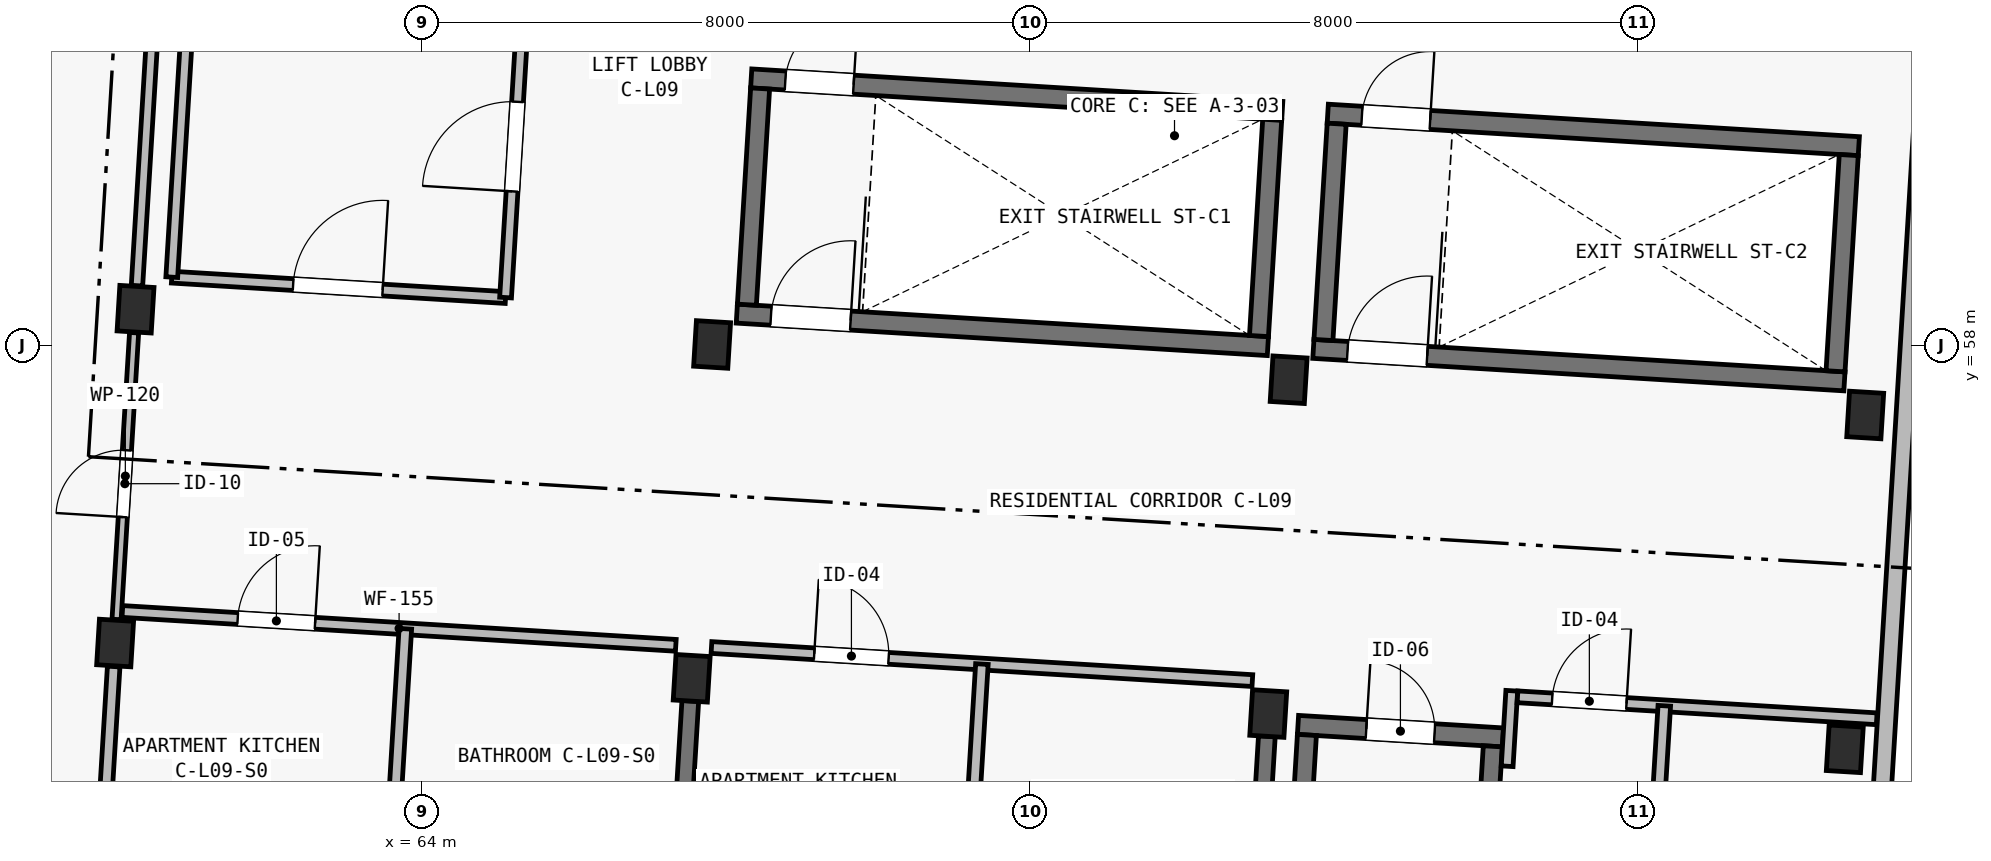
"""IFC4 building model, lengths in metres.
Left out: names, types, materials, properties, quantities, classifications, styles, units other than length and angle.
Written with IfcOpenShell. Run it as: python <this file> out.ifc"""

import sys

from ifc_helpers import new_model, si_unit, direction, frame, frame_2d, origin, origin_2d, place, context, subcontext, project, spatial, polyline, rectangle, outline, extrude, element, fill, save


model = new_model("IFC4")
c1 = context("Model", 3, precision=1e-05, world=origin(), true_north=direction((0.0, 1.0)))
c2 = subcontext(c1, "Body", "Model", "MODEL_VIEW")
j1 = project(units=[si_unit("LENGTHUNIT", "METRE"), si_unit("PLANEANGLEUNIT", "RADIAN")], contexts=[c1])
p1 = place(None, origin())
s1 = spatial("IfcSite", under=j1, at=p1, CompositionType="ELEMENT")
p2 = place(p1, origin())
s2 = spatial("IfcBuilding", under=s1, at=p2, CompositionType="ELEMENT")
p3 = place(p2, frame((0.0, 0.0, 31.15)))
s3 = spatial("IfcBuildingStorey", under=s2, at=p3, CompositionType="ELEMENT", Elevation=31.15)
for number, where, z_axis, x_axis in (
    (1, (59.964, 54.086, 0.0), (0.0, 0.0, 1.0), (0.998, -0.061, 0.0)),
    (2, (60.233, 58.478, 0.0), (0.0, 0.0, 1.0), (0.998, -0.061, 0.0)),
):
    element("IfcColumn", number, at=place(p3, frame(where, z_axis=z_axis, x_axis=x_axis)), inside=s3, PredefinedType="COLUMN", context=c2, shape_type="SweptSolid", body=[
        extrude(rectangle(XDim=0.45, YDim=0.6, at=origin_2d()), origin(), (0.0, 0.0, 1.0), 6.895),
    ])
for number, where, z_axis, x_axis in (
    (3, (67.55, 53.622, 0.0), (0.0, 0.0, 1.0), (0.998, -0.061, 0.0)),
    (4, (67.818, 58.014, 0.0), (0.0, 0.0, 1.0), (0.998, -0.061, 0.0)),
    (5, (75.135, 53.158, 0.0), (0.0, 0.0, 1.0), (0.998, -0.061, 0.0)),
    (6, (75.404, 57.55, 0.0), (0.0, 0.0, 1.0), (0.998, -0.061, 0.0)),
):
    element("IfcColumn", number, at=place(p3, frame(where, z_axis=z_axis, x_axis=x_axis)), inside=s3, PredefinedType="COLUMN", context=c2, shape_type="SweptSolid", body=[
        extrude(rectangle(XDim=0.45, YDim=0.6, at=origin_2d()), origin(), (0.0, 0.0, 1.0), 3.25),
    ])
for number, where, z_axis, x_axis in (
    (7, (82.721, 52.694, 0.0), (0.0, 0.0, 1.0), (0.998, -0.061, 0.0)),
    (8, (82.99, 57.086, 0.0), (0.0, 0.0, 1.0), (0.998, -0.061, 0.0)),
):
    element("IfcColumn", number, at=place(p3, frame(where, z_axis=z_axis, x_axis=x_axis)), inside=s3, PredefinedType="COLUMN", context=c2, shape_type="SweptSolid", body=[
        extrude(rectangle(XDim=0.45, YDim=0.6, at=origin_2d()), origin(), (0.0, 0.0, 1.0), 3.0),
    ])
p4 = place(p3, frame((67.104, 46.335, 0.0), z_axis=(0.0, 0.0, 1.0), x_axis=(0.061034188237, 0.998135676081, 0.0)))
e9 = element("IfcWall", 9, at=p4, inside=s3, PredefinedType="SHEAR", context=c2, shape_type="SweptSolid", body=[
    extrude(rectangle(XDim=7.0, YDim=0.22, at=frame_2d((3.5, 0.0))), origin(), (0.0, 0.0, 1.0), 2.5),
])
p5 = place(p3, frame((74.69, 45.872, 0.0), z_axis=(0.0, 0.0, 1.0), x_axis=(0.061036313012, 0.998135546153, 0.0)))
e10 = element("IfcWall", 10, at=p5, inside=s3, PredefinedType="SHEAR", context=c2, shape_type="SweptSolid", body=[
    extrude(rectangle(XDim=7.0, YDim=0.22, at=frame_2d((3.5, 0.0))), origin(), (0.0, 0.0, 1.0), 2.5),
])
p6 = place(p3, frame((68.333, 61.514, 0.0), z_axis=(0.0, 0.0, 1.0), x_axis=(0.998135676081, -0.061034188237, 0.0)))
e11 = element("IfcWall", 11, at=p6, inside=s3, PredefinedType="SHEAR", context=c2, shape_type="SweptSolid", body=[
    extrude(rectangle(XDim=7.0, YDim=0.25, at=frame_2d((3.5, 0.0))), origin(), (0.0, 0.0, 1.0), 3.25),
])
p7 = place(p6, frame((0.45, 0.0, 0.0)))
e12 = element("IfcOpeningElement", 12, at=p7, cuts=e11, PredefinedType="OPENING", context=c2, shape_type="SweptSolid", body=[
    extrude(rectangle(XDim=0.9, YDim=2.1, at=frame_2d((0.45, 1.05))), frame((0.0, 0.14, 0.0), z_axis=(0.0, -1.0, 0.0), x_axis=(1.0, 0.0, 0.0)), (0.0, 0.0, 1.0), 0.28),
])
p8 = place(p3, frame((68.144, 58.419, 0.0), z_axis=(0.0, 0.0, 1.0), x_axis=(0.998135546153, -0.061036313012, 0.0)))
e13 = element("IfcWall", 13, at=p8, inside=s3, PredefinedType="SHEAR", context=c2, shape_type="SweptSolid", body=[
    extrude(rectangle(XDim=7.0, YDim=0.25, at=frame_2d((3.5, 0.0))), origin(), (0.0, 0.0, 1.0), 3.25),
])
p9 = place(p8, frame((0.45, 0.0, 0.0)))
e14 = element("IfcOpeningElement", 14, at=p9, cuts=e13, PredefinedType="OPENING", context=c2, shape_type="SweptSolid", body=[
    extrude(rectangle(XDim=1.05, YDim=2.15, at=frame_2d((0.525, 1.075))), frame((0.0, 0.14, 0.0), z_axis=(0.0, -1.0, 0.0), x_axis=(1.0, 0.0, 0.0)), (0.0, 0.0, 1.0), 0.28),
])
for number, where, z_axis, x_axis in (
    (15, (68.276, 58.537, 0.0), (0.0, 0.0, 1.0), (0.061, 0.998, 0.0)),
    (16, (75.014, 58.125, 0.0), (0.0, 0.0, 1.0), (0.061, 0.998, 0.0)),
):
    element("IfcWall", number, at=place(p3, frame(where, z_axis=z_axis, x_axis=x_axis)), inside=s3, PredefinedType="SHEAR", context=c2, shape_type="SweptSolid", body=[
        extrude(rectangle(XDim=2.85, YDim=0.25, at=frame_2d((1.425, 0.0))), origin(), (0.0, 0.0, 1.0), 3.25),
    ])
p10 = place(p3, frame((75.919, 61.05, 0.0), z_axis=(0.0, 0.0, 1.0), x_axis=(0.998135546153, -0.061036313012, 0.0)))
e17 = element("IfcWall", 17, at=p10, inside=s3, PredefinedType="SHEAR", context=c2, shape_type="SweptSolid", body=[
    extrude(rectangle(XDim=7.0, YDim=0.25, at=frame_2d((3.5, 0.0))), origin(), (0.0, 0.0, 1.0), 2.708),
])
p11 = place(p10, frame((0.45, 0.0, 0.0)))
e18 = element("IfcOpeningElement", 18, at=p11, cuts=e17, PredefinedType="OPENING", context=c2, shape_type="SweptSolid", body=[
    extrude(rectangle(XDim=0.9, YDim=2.1, at=frame_2d((0.45, 1.05))), frame((0.0, 0.14, 0.0), z_axis=(0.0, -1.0, 0.0), x_axis=(1.0, 0.0, 0.0)), (0.0, 0.0, 1.0), 0.28),
])
p12 = place(p3, frame((75.73, 57.956, 0.0), z_axis=(0.0, 0.0, 1.0), x_axis=(0.998135546153, -0.061036313012, 0.0)))
e19 = element("IfcWall", 19, at=p12, inside=s3, PredefinedType="SHEAR", context=c2, shape_type="SweptSolid", body=[
    extrude(rectangle(XDim=7.0, YDim=0.25, at=frame_2d((3.5, 0.0))), origin(), (0.0, 0.0, 1.0), 2.708),
])
p13 = place(p12, frame((0.45, 0.0, 0.0)))
e20 = element("IfcOpeningElement", 20, at=p13, cuts=e19, PredefinedType="OPENING", context=c2, shape_type="SweptSolid", body=[
    extrude(rectangle(XDim=1.05, YDim=2.15, at=frame_2d((0.525, 1.075))), frame((0.0, 0.14, 0.0), z_axis=(0.0, -1.0, 0.0), x_axis=(1.0, 0.0, 0.0)), (0.0, 0.0, 1.0), 0.28),
])
for number, where, z_axis, x_axis in (
    (21, (75.862, 58.073, 0.0), (0.0, 0.0, 1.0), (0.061, 0.998, 0.0)),
    (22, (82.599, 57.661, 0.0), (0.0, 0.0, 1.0), (0.061, 0.998, 0.0)),
):
    element("IfcWall", number, at=place(p3, frame(where, z_axis=z_axis, x_axis=x_axis)), inside=s3, PredefinedType="SHEAR", context=c2, shape_type="SweptSolid", body=[
        extrude(rectangle(XDim=2.85, YDim=0.25, at=frame_2d((1.425, 0.0))), origin(), (0.0, 0.0, 1.0), 2.708),
    ])
p14 = place(p3, frame((75.527, 53.009, 0.0), z_axis=(0.0, 0.0, 1.0), x_axis=(0.998129907752, -0.061128448781, 0.0)))
e23 = element("IfcWall", 23, at=p14, inside=s3, PredefinedType="SHEAR", context=c2, shape_type="SweptSolid", body=[
    extrude(rectangle(XDim=2.7, YDim=0.25, at=frame_2d((1.35, 0.0))), origin(), (0.0, 0.0, 1.0), 3.25),
])
p15 = place(p14, frame((0.9, 0.0, 0.0)))
e24 = element("IfcOpeningElement", 24, at=p15, cuts=e23, PredefinedType="OPENING", context=c2, shape_type="SweptSolid", body=[
    extrude(rectangle(XDim=0.9, YDim=2.05, at=frame_2d((0.45, 1.025))), frame((0.0, 0.14, 0.0), z_axis=(0.0, -1.0, 0.0), x_axis=(1.0, 0.0, 0.0)), (0.0, 0.0, 1.0), 0.28),
])
p16 = place(p3, frame((75.541, 51.179, 0.0), z_axis=(0.0, 0.0, 1.0), x_axis=(0.061037062968, 0.998135500293, 0.0)))
e25 = element("IfcWall", 25, at=p16, inside=s3, PredefinedType="SHEAR", context=c2, shape_type="SweptSolid", body=[
    extrude(rectangle(XDim=1.7, YDim=0.25, at=frame_2d((0.85, 0.0))), origin(), (0.0, 0.0, 1.0), 3.25),
])
p17 = place(p3, frame((77.986, 51.03, 0.0), z_axis=(0.0, 0.0, 1.0), x_axis=(0.061028314627, 0.998136035225, 0.0)))
e26 = element("IfcWall", 26, at=p17, inside=s3, PredefinedType="SHEAR", context=c2, shape_type="SweptSolid", body=[
    extrude(rectangle(XDim=1.7, YDim=0.25, at=frame_2d((0.85, 0.0))), origin(), (0.0, 0.0, 1.0), 3.25),
])
p18 = place(p3, frame((51.654, 49.585, 0.0), z_axis=(0.0, 0.0, 1.0), x_axis=(0.448621989068, 0.893721607059, 0.0)))
e27 = element("IfcWall", 27, at=p18, inside=s3, PredefinedType="SOLIDWALL", context=c2, shape_type="SweptSolid", body=[
    extrude(outline(polyline([(0.0, 0.0), (19.061, 0.0), (19.06, 7.561), (0.0, 9.003), (0.0, 0.0)])), frame((0.0, 0.13, 0.0), z_axis=(0.0, -1.0, 0.0), x_axis=(1.0, 0.0, 0.0)), (0.0, 0.0, 1.0), 0.26),
])
p19 = place(p18, frame((2.63, 0.0, 0.52)))
e28 = element("IfcOpeningElement", 28, at=p19, cuts=e27, PredefinedType="OPENING", context=c2, shape_type="SweptSolid", body=[
    extrude(rectangle(XDim=0.76, YDim=2.34, at=frame_2d((0.38, 1.17))), frame((0.0, 0.145, 0.0), z_axis=(0.0, -1.0, 0.0), x_axis=(1.0, 0.0, 0.0)), (0.0, 0.0, 1.0), 0.29),
])
p20 = place(p18, frame((15.47, 0.0, 0.45)))
e29 = element("IfcOpeningElement", 29, at=p20, cuts=e27, PredefinedType="OPENING", context=c2, shape_type="SweptSolid", body=[
    extrude(rectangle(XDim=0.6, YDim=2.22, at=frame_2d((0.3, 1.11))), frame((0.0, 0.145, 0.0), z_axis=(0.0, -1.0, 0.0), x_axis=(1.0, 0.0, 0.0)), (0.0, 0.0, 1.0), 0.29),
])
p21 = place(p3, frame((84.01, 65.164, 0.0), z_axis=(0.0, 0.0, 1.0), x_axis=(-0.061040833846, -0.998135269692, 0.0)))
e30 = element("IfcWall", 30, at=p21, inside=s3, PredefinedType="SOLIDWALL", context=c2, shape_type="SweptSolid", body=[
    extrude(rectangle(XDim=20.65, YDim=0.24, at=frame_2d((10.325, 0.0))), origin(), (0.0, 0.0, 1.0), 2.972),
])
p22 = place(p21, frame((2.63, 0.0, 0.52)))
e31 = element("IfcOpeningElement", 31, at=p22, cuts=e30, PredefinedType="OPENING", context=c2, shape_type="SweptSolid", body=[
    extrude(rectangle(XDim=0.72, YDim=2.16, at=frame_2d((0.36, 1.08))), frame((0.0, 0.135, 0.0), z_axis=(0.0, -1.0, 0.0), x_axis=(1.0, 0.0, 0.0)), (0.0, 0.0, 1.0), 0.27),
])
p23 = place(p21, frame((16.8, 0.0, 0.45)))
e32 = element("IfcOpeningElement", 32, at=p23, cuts=e30, PredefinedType="OPENING", context=c2, shape_type="SweptSolid", body=[
    extrude(rectangle(XDim=0.86, YDim=2.36, at=frame_2d((0.43, 1.18))), frame((0.0, 0.135, 0.0), z_axis=(0.0, -1.0, 0.0), x_axis=(1.0, 0.0, 0.0)), (0.0, 0.0, 1.0), 0.27),
])
p24 = place(p3, frame((60.709, 58.899, 0.0), z_axis=(0.0, 0.0, 1.0), x_axis=(0.998132276607, -0.061089756882, 0.0)))
e33 = element("IfcWall", 33, at=p24, inside=s3, PredefinedType="PARTITIONING", context=c2, shape_type="SweptSolid", body=[
    extrude(rectangle(XDim=4.4, YDim=0.155, at=frame_2d((2.2, 0.0))), origin(), (0.0, 0.0, 1.0), 3.15),
])
p25 = place(p24, frame((1.6, 0.0, 0.0)))
e34 = element("IfcOpeningElement", 34, at=p25, cuts=e33, PredefinedType="OPENING", context=c2, shape_type="SweptSolid", body=[
    extrude(rectangle(XDim=1.18, YDim=2.15, at=frame_2d((0.59, 1.075))), frame((0.0, 0.093, 0.0), z_axis=(0.0, -1.0, 0.0), x_axis=(1.0, 0.0, 0.0)), (0.0, 0.0, 1.0), 0.185),
])
p26 = place(p3, frame((60.709, 58.899, 0.0), z_axis=(0.0, 0.0, 1.0), x_axis=(0.061036844229, 0.998135513669, 0.0)))
e35 = element("IfcWall", 35, at=p26, inside=s3, PredefinedType="PARTITIONING", context=c2, shape_type="SweptSolid", body=[
    extrude(rectangle(XDim=4.0, YDim=0.155, at=frame_2d((2.0, 0.0))), origin(), (0.0, 0.0, 1.0), 3.15),
])
p27 = place(p3, frame((65.101, 58.631, 0.0), z_axis=(0.0, 0.0, 1.0), x_axis=(0.061033125904, 0.99813574104, 0.0)))
e36 = element("IfcWall", 36, at=p27, inside=s3, PredefinedType="PARTITIONING", context=c2, shape_type="SweptSolid", body=[
    extrude(rectangle(XDim=4.0, YDim=0.155, at=frame_2d((2.0, 0.0))), origin(), (0.0, 0.0, 1.0), 3.15),
])
p28 = place(p27, frame((1.4, 0.0, 0.0)))
e37 = element("IfcOpeningElement", 37, at=p28, cuts=e36, PredefinedType="OPENING", context=c2, shape_type="SweptSolid", body=[
    extrude(rectangle(XDim=1.18, YDim=2.15, at=frame_2d((0.59, 1.075))), frame((0.0, 0.093, 0.0), z_axis=(0.0, -1.0, 0.0), x_axis=(1.0, 0.0, 0.0)), (0.0, 0.0, 1.0), 0.185),
])
p29 = place(p3, frame((59.983, 54.395, 0.0), z_axis=(0.0, 0.0, 1.0), x_axis=(0.061035211258, 0.998135613525, 0.0)))
e38 = element("IfcWall", 38, at=p29, inside=s3, PredefinedType="PARTITIONING", context=c2, shape_type="SweptSolid", body=[
    extrude(rectangle(XDim=3.78, YDim=0.12, at=frame_2d((1.89, 0.0))), origin(), (0.0, 0.0, 1.0), 3.15),
])
p30 = place(p29, frame((1.35, 0.0, 0.0)))
e39 = element("IfcOpeningElement", 39, at=p30, cuts=e38, PredefinedType="OPENING", context=c2, shape_type="SweptSolid", body=[
    extrude(rectangle(XDim=0.88, YDim=2.1, at=frame_2d((0.44, 1.05))), frame((0.0, 0.075, 0.0), z_axis=(0.0, -1.0, 0.0), x_axis=(1.0, 0.0, 0.0)), (0.0, 0.0, 1.0), 0.15),
])
p31 = place(p3, frame((60.251, 58.787, 0.0), z_axis=(0.0, 0.0, 1.0), x_axis=(0.061071659957, 0.998133384047, 0.0)))
e40 = element("IfcWall", 40, at=p31, inside=s3, PredefinedType="PARTITIONING", context=c2, shape_type="SweptSolid", body=[
    extrude(rectangle(XDim=6.98, YDim=0.15, at=frame_2d((3.49, 0.0))), origin(), (0.0, 0.0, 1.0), 3.15),
])
p32 = place(p3, frame((59.519, 46.809, 0.0), z_axis=(0.0, 0.0, 1.0), x_axis=(0.061034681366, 0.998135645927, 0.0)))
e41 = element("IfcWall", 41, at=p32, inside=s3, PredefinedType="PLUMBINGWALL", context=c2, shape_type="SweptSolid", body=[
    extrude(rectangle(XDim=6.98, YDim=0.165, at=frame_2d((3.49, 0.0))), origin(), (0.0, 0.0, 1.0), 3.15),
])
p33 = place(p3, frame((60.06, 54.501, 0.0), z_axis=(0.0, 0.0, 1.0), x_axis=(0.998135030865, -0.061044739012, 0.0)))
e42 = element("IfcWall", 42, at=p33, inside=s3, PredefinedType="PARTITIONING", context=c2, shape_type="SweptSolid", body=[
    extrude(rectangle(XDim=7.295, YDim=0.155, at=frame_2d((3.647, 0.0))), origin(), (0.0, 0.0, 1.0), 3.15),
])
p34 = place(p33, frame((1.52, 0.0, 0.0)))
e43 = element("IfcOpeningElement", 43, at=p34, cuts=e42, PredefinedType="OPENING", context=c2, shape_type="SweptSolid", body=[
    extrude(rectangle(XDim=1.02, YDim=2.2, at=frame_2d((0.51, 1.1))), frame((0.0, 0.093, 0.0), z_axis=(0.0, -1.0, 0.0), x_axis=(1.0, 0.0, 0.0)), (0.0, 0.0, 1.0), 0.185),
])
p35 = place(p3, frame((63.555, 50.56, 0.0), z_axis=(0.0, 0.0, 1.0), x_axis=(0.061038003798, 0.998135442759, 0.0)))
e44 = element("IfcWall", 44, at=p35, inside=s3, PredefinedType="PLUMBINGWALL", context=c2, shape_type="SweptSolid", body=[
    extrude(rectangle(XDim=3.72, YDim=0.165, at=frame_2d((1.86, 0.0))), origin(), (0.0, 0.0, 1.0), 3.15),
])
p36 = place(p3, frame((67.81, 54.027, 0.0), z_axis=(0.0, 0.0, 1.0), x_axis=(0.998136655722, -0.061018165369, 0.0)))
e45 = element("IfcWall", 45, at=p36, inside=s3, PredefinedType="PARTITIONING", context=c2, shape_type="SweptSolid", body=[
    extrude(rectangle(XDim=7.13, YDim=0.155, at=frame_2d((3.565, 0.0))), origin(), (0.0, 0.0, 1.0), 3.15),
])
p37 = place(p36, frame((1.355, 0.0, 0.0)))
e46 = element("IfcOpeningElement", 46, at=p37, cuts=e45, PredefinedType="OPENING", context=c2, shape_type="SweptSolid", body=[
    extrude(rectangle(XDim=0.98, YDim=2.15, at=frame_2d((0.49, 1.075))), frame((0.0, 0.093, 0.0), z_axis=(0.0, -1.0, 0.0), x_axis=(1.0, 0.0, 0.0)), (0.0, 0.0, 1.0), 0.185),
])
p38 = place(p3, frame((71.141, 50.096, 0.0), z_axis=(0.0, 0.0, 1.0), x_axis=(0.061034005467, 0.998135687257, 0.0)))
e47 = element("IfcWall", 47, at=p38, inside=s3, PredefinedType="PLUMBINGWALL", context=c2, shape_type="SweptSolid", body=[
    extrude(rectangle(XDim=3.72, YDim=0.165, at=frame_2d((1.86, 0.0))), origin(), (0.0, 0.0, 1.0), 3.15),
])
p39 = place(p3, frame((78.279, 52.465, 0.0), z_axis=(0.0, 0.0, 1.0), x_axis=(0.061095097219, 0.998131949742, 0.0)))
e48 = element("IfcWall", 48, at=p39, inside=s3, PredefinedType="PARTITIONING", context=c2, shape_type="SweptSolid", body=[
    extrude(rectangle(XDim=0.995, YDim=0.155, at=frame_2d((0.498, 0.0))), origin(), (0.0, 0.0, 1.0), 3.018),
])
p40 = place(p3, frame((78.415, 53.378, 0.0), z_axis=(0.0, 0.0, 1.0), x_axis=(0.998134754438, -0.061049258666, 0.0)))
e49 = element("IfcWall", 49, at=p40, inside=s3, PredefinedType="PARTITIONING", context=c2, shape_type="SweptSolid", body=[
    extrude(rectangle(XDim=4.735, YDim=0.155, at=frame_2d((2.367, 0.0))), origin(), (0.0, 0.0, 1.0), 3.018),
])
p41 = place(p40, frame((0.457, 0.0, 0.0)))
e50 = element("IfcOpeningElement", 50, at=p41, cuts=e49, PredefinedType="OPENING", context=c2, shape_type="SweptSolid", body=[
    extrude(rectangle(XDim=0.98, YDim=2.15, at=frame_2d((0.49, 1.075))), frame((0.0, 0.093, 0.0), z_axis=(0.0, -1.0, 0.0), x_axis=(1.0, 0.0, 0.0)), (0.0, 0.0, 1.0), 0.185),
])
p42 = place(p3, frame((80.119, 49.547, 0.0), z_axis=(0.0, 0.0, 1.0), x_axis=(0.061099388563, 0.998131687062, 0.0)))
e51 = element("IfcWall", 51, at=p42, inside=s3, PredefinedType="PLUMBINGWALL", context=c2, shape_type="SweptSolid", body=[
    extrude(rectangle(XDim=3.72, YDim=0.165, at=frame_2d((1.86, 0.0))), origin(), (0.0, 0.0, 1.0), 3.018),
])
p43 = place(p25, origin())
e52 = element("IfcDoor", 52, at=p43, inside=s3, OperationType="SINGLE_SWING_RIGHT", PredefinedType="DOOR", context=c2, shape_type="SweptSolid", body=[
    extrude(rectangle(XDim=1.18, YDim=2.15, at=frame_2d((0.59, 1.075))), frame((0.0, 0.025, 0.0), z_axis=(0.0, -1.0, 0.0), x_axis=(1.0, 0.0, 0.0)), (0.0, 0.0, 1.0), 0.05),
])
fill(e34, e52)
p44 = place(p28, origin())
e53 = element("IfcDoor", 53, at=p44, inside=s3, OperationType="SINGLE_SWING_LEFT", PredefinedType="DOOR", context=c2, shape_type="SweptSolid", body=[
    extrude(rectangle(XDim=1.18, YDim=2.15, at=frame_2d((0.59, 1.075))), frame((0.0, 0.025, 0.0), z_axis=(0.0, -1.0, 0.0), x_axis=(1.0, 0.0, 0.0)), (0.0, 0.0, 1.0), 0.05),
])
fill(e37, e53)
p45 = place(p30, origin())
e54 = element("IfcDoor", 54, at=p45, inside=s3, OperationType="SINGLE_SWING_LEFT", PredefinedType="DOOR", context=c2, shape_type="SweptSolid", body=[
    extrude(rectangle(XDim=0.88, YDim=2.1, at=frame_2d((0.44, 1.05))), frame((0.0, 0.025, 0.0), z_axis=(0.0, -1.0, 0.0), x_axis=(1.0, 0.0, 0.0)), (0.0, 0.0, 1.0), 0.05),
])
fill(e39, e54)
p46 = place(p34, origin())
e55 = element("IfcDoor", 55, at=p46, inside=s3, OperationType="SINGLE_SWING_RIGHT", PredefinedType="DOOR", context=c2, shape_type="SweptSolid", body=[
    extrude(rectangle(XDim=1.02, YDim=2.2, at=frame_2d((0.51, 1.1))), frame((0.0, 0.025, 0.0), z_axis=(0.0, -1.0, 0.0), x_axis=(1.0, 0.0, 0.0)), (0.0, 0.0, 1.0), 0.05),
])
fill(e43, e55)
p47 = place(p37, origin())
e56 = element("IfcDoor", 56, at=p47, inside=s3, OperationType="SINGLE_SWING_LEFT", PredefinedType="DOOR", context=c2, shape_type="SweptSolid", body=[
    extrude(rectangle(XDim=0.98, YDim=2.15, at=frame_2d((0.49, 1.075))), frame((0.0, 0.025, 0.0), z_axis=(0.0, -1.0, 0.0), x_axis=(1.0, 0.0, 0.0)), (0.0, 0.0, 1.0), 0.05),
])
fill(e46, e56)
p48 = place(p41, origin())
e57 = element("IfcDoor", 57, at=p48, inside=s3, OperationType="SINGLE_SWING_RIGHT", PredefinedType="DOOR", context=c2, shape_type="SweptSolid", body=[
    extrude(rectangle(XDim=0.98, YDim=2.15, at=frame_2d((0.49, 1.075))), frame((0.0, 0.025, 0.0), z_axis=(0.0, -1.0, 0.0), x_axis=(1.0, 0.0, 0.0)), (0.0, 0.0, 1.0), 0.05),
])
fill(e50, e57)
p49 = place(p9, origin())
e58 = element("IfcDoor", 58, at=p49, inside=s3, OperationType="SINGLE_SWING_RIGHT", PredefinedType="DOOR", context=c2, shape_type="SweptSolid", body=[
    extrude(rectangle(XDim=1.05, YDim=2.15, at=frame_2d((0.525, 1.075))), frame((0.0, 0.025, 0.0), z_axis=(0.0, -1.0, 0.0), x_axis=(1.0, 0.0, 0.0)), (0.0, 0.0, 1.0), 0.05),
])
fill(e14, e58)
p50 = place(p7, origin())
e59 = element("IfcDoor", 59, at=p50, inside=s3, OperationType="SINGLE_SWING_RIGHT", PredefinedType="DOOR", context=c2, shape_type="SweptSolid", body=[
    extrude(rectangle(XDim=0.9, YDim=2.1, at=frame_2d((0.45, 1.05))), frame((0.0, 0.025, 0.0), z_axis=(0.0, -1.0, 0.0), x_axis=(1.0, 0.0, 0.0)), (0.0, 0.0, 1.0), 0.05),
])
fill(e12, e59)
p51 = place(p13, origin())
e60 = element("IfcDoor", 60, at=p51, inside=s3, OperationType="SINGLE_SWING_RIGHT", PredefinedType="DOOR", context=c2, shape_type="SweptSolid", body=[
    extrude(rectangle(XDim=1.05, YDim=2.15, at=frame_2d((0.525, 1.075))), frame((0.0, 0.025, 0.0), z_axis=(0.0, -1.0, 0.0), x_axis=(1.0, 0.0, 0.0)), (0.0, 0.0, 1.0), 0.05),
])
fill(e20, e60)
p52 = place(p11, origin())
e61 = element("IfcDoor", 61, at=p52, inside=s3, OperationType="SINGLE_SWING_RIGHT", PredefinedType="DOOR", context=c2, shape_type="SweptSolid", body=[
    extrude(rectangle(XDim=0.9, YDim=2.1, at=frame_2d((0.45, 1.05))), frame((0.0, 0.025, 0.0), z_axis=(0.0, -1.0, 0.0), x_axis=(1.0, 0.0, 0.0)), (0.0, 0.0, 1.0), 0.05),
])
fill(e18, e61)
p53 = place(p15, origin())
e62 = element("IfcDoor", 62, at=p53, inside=s3, OperationType="SINGLE_SWING_LEFT", PredefinedType="DOOR", context=c2, shape_type="SweptSolid", body=[
    extrude(rectangle(XDim=0.9, YDim=2.05, at=frame_2d((0.45, 1.025))), frame((0.0, 0.025, 0.0), z_axis=(0.0, -1.0, 0.0), x_axis=(1.0, 0.0, 0.0)), (0.0, 0.0, 1.0), 0.05),
])
fill(e24, e62)
save(model, sys.argv[1])
